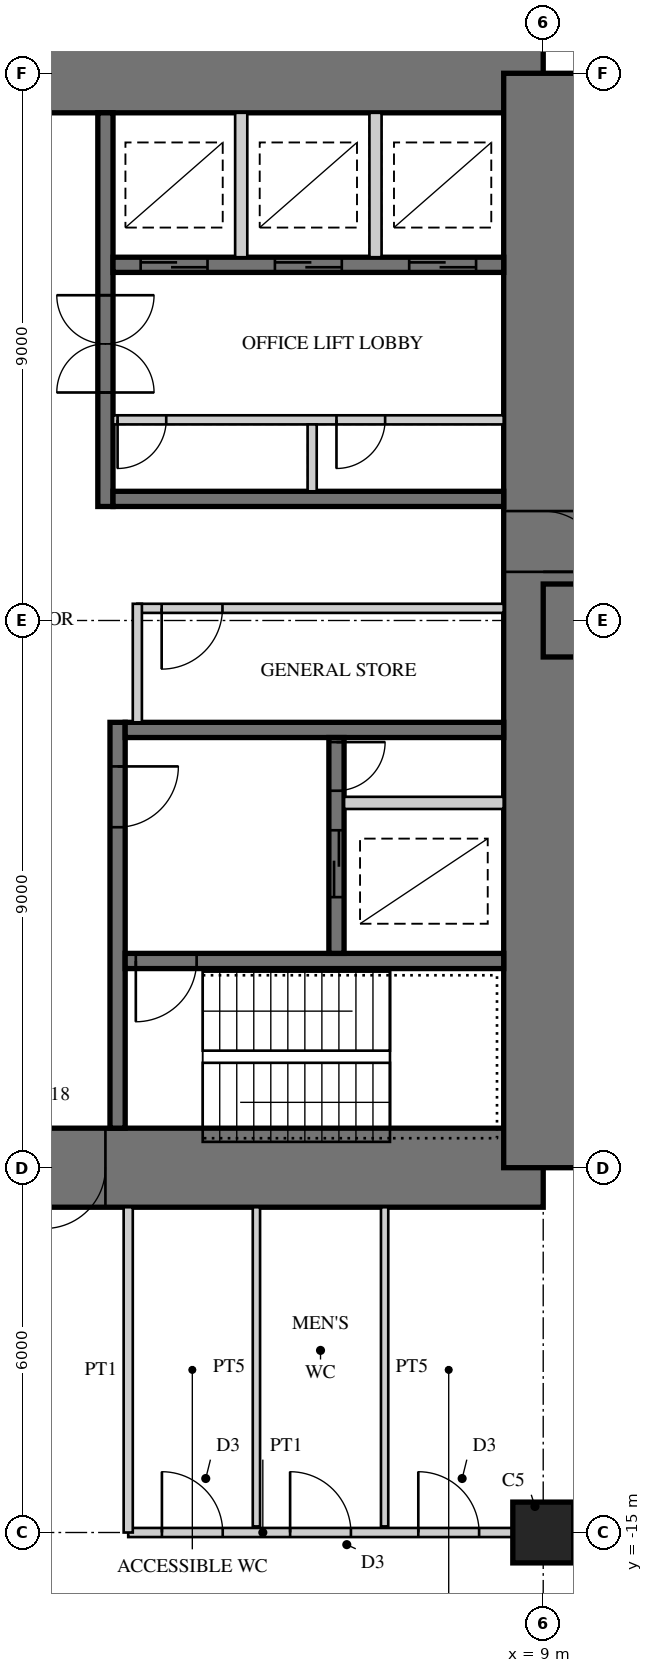
"""IFC4 building model, lengths in metres.
Left out: names, types, materials, properties, quantities, classifications, styles, units other than length and angle.
Written with IfcOpenShell. Run it as: python <this file> out.ifc"""

import sys

from ifc_helpers import new_model, si_unit, direction, frame, frame_2d, origin, origin_2d, place, context, subcontext, project, spatial, rectangle, extrude, element, fill, save


model = new_model("IFC4")
c1 = context("Model", 3, precision=1e-05, world=origin(), true_north=direction((0.0, 1.0)))
c2 = subcontext(c1, "Body", "Model", "MODEL_VIEW")
j1 = project(units=[si_unit("LENGTHUNIT", "METRE"), si_unit("PLANEANGLEUNIT", "RADIAN")], contexts=[c1])
p1 = place(None, origin())
s1 = spatial("IfcSite", under=j1, at=p1, CompositionType="ELEMENT")
p2 = place(p1, origin())
s2 = spatial("IfcBuilding", under=s1, at=p2, CompositionType="ELEMENT")
p3 = place(p2, frame((0.0, 0.0, 100.5)))
s3 = spatial("IfcBuildingStorey", under=s2, at=p3, CompositionType="ELEMENT", Elevation=100.5)
p4 = place(p3, frame((9.0, 9.0, 0.0), z_axis=(0.0, 0.0, 1.0), x_axis=(-1.0, 0.0, 0.0)))
e1 = element("IfcWall", 1, at=p4, inside=s3, PredefinedType="SHEAR", context=c2, shape_type="SweptSolid", body=[
    extrude(rectangle(XDim=18.0, YDim=1.3, at=frame_2d((9.0, 0.0))), origin(), (0.0, 0.0, 1.0), 4.0),
])
p5 = place(p4, frame((9.8, 0.0, 0.0)))
e2 = element("IfcOpeningElement", 2, at=p5, cuts=e1, PredefinedType="OPENING", context=c2, shape_type="SweptSolid", body=[
    extrude(rectangle(XDim=1.0, YDim=2.4, at=frame_2d((0.5, 1.2))), frame((0.0, 0.66, 0.0), z_axis=(0.0, -1.0, 0.0), x_axis=(1.0, 0.0, 0.0)), (0.0, 0.0, 1.0), 1.32),
])
p6 = place(p3, frame((-9.0, -9.0, 0.0), z_axis=(0.0, 0.0, 1.0), x_axis=(1.0, 0.0, 0.0)))
e3 = element("IfcWall", 3, at=p6, inside=s3, PredefinedType="SHEAR", context=c2, shape_type="SweptSolid", body=[
    extrude(rectangle(XDim=18.0, YDim=1.3, at=frame_2d((9.0, 0.0))), origin(), (0.0, 0.0, 1.0), 4.0),
])
p7 = place(p6, frame((9.8, 0.0, 0.0)))
e4 = element("IfcOpeningElement", 4, at=p7, cuts=e3, PredefinedType="OPENING", context=c2, shape_type="SweptSolid", body=[
    extrude(rectangle(XDim=1.0, YDim=2.4, at=frame_2d((0.5, 1.2))), frame((0.0, 0.66, 0.0), z_axis=(0.0, -1.0, 0.0), x_axis=(1.0, 0.0, 0.0)), (0.0, 0.0, 1.0), 1.32),
])
p8 = place(p3, frame((9.0, -9.0, 0.0), z_axis=(0.0, 0.0, 1.0), x_axis=(0.0, 1.0, 0.0)))
e5 = element("IfcWall", 5, at=p8, inside=s3, PredefinedType="SHEAR", context=c2, shape_type="SweptSolid", body=[
    extrude(rectangle(XDim=18.0, YDim=1.3, at=frame_2d((9.0, 0.0))), origin(), (0.0, 0.0, 1.0), 4.0),
])
p9 = place(p8, frame((9.8, 0.0, 0.0)))
e6 = element("IfcOpeningElement", 6, at=p9, cuts=e5, PredefinedType="OPENING", context=c2, shape_type="SweptSolid", body=[
    extrude(rectangle(XDim=1.0, YDim=2.4, at=frame_2d((0.5, 1.2))), frame((0.0, 0.66, 0.0), z_axis=(0.0, -1.0, 0.0), x_axis=(1.0, 0.0, 0.0)), (0.0, 0.0, 1.0), 1.32),
])
p10 = place(p3, frame((1.8, 1.875, 0.0), z_axis=(0.0, 0.0, 1.0), x_axis=(0.0, 1.0, 0.0)))
e7 = element("IfcWall", 7, at=p10, inside=s3, PredefinedType="SHEAR", context=c2, shape_type="SweptSolid", body=[
    extrude(rectangle(XDim=6.475, YDim=0.25, at=frame_2d((3.238, 0.0))), origin(), (0.0, 0.0, 1.0), 4.0),
])
p11 = place(p10, frame((1.875, 0.0, 0.0)))
e8 = element("IfcOpeningElement", 8, at=p11, cuts=e7, PredefinedType="OPENING", context=c2, shape_type="SweptSolid", body=[
    extrude(rectangle(XDim=1.6, YDim=2.4, at=frame_2d((0.8, 1.2))), frame((0.0, 0.135, 0.0), z_axis=(0.0, -1.0, 0.0), x_axis=(1.0, 0.0, 0.0)), (0.0, 0.0, 1.0), 0.27),
])
p12 = place(p3, frame((1.925, 2.0, 0.0), z_axis=(0.0, 0.0, 1.0), x_axis=(1.0, 0.0, 0.0)))
e9 = element("IfcWall", 9, at=p12, inside=s3, PredefinedType="SHEAR", context=c2, shape_type="SweptSolid", body=[
    extrude(rectangle(XDim=6.425, YDim=0.25, at=frame_2d((3.212, 0.0))), origin(), (0.0, 0.0, 1.0), 4.0),
])
p13 = place(p3, frame((1.925, 5.85, 0.0), z_axis=(0.0, 0.0, 1.0), x_axis=(1.0, 0.0, 0.0)))
e10 = element("IfcWall", 10, at=p13, inside=s3, PredefinedType="SHEAR", context=c2, shape_type="SweptSolid", body=[
    extrude(rectangle(XDim=6.425, YDim=0.25, at=frame_2d((3.212, 0.0))), origin(), (0.0, 0.0, 1.0), 4.0),
])
p14 = place(p13, frame((0.454, 0.0, 0.0)))
e11 = element("IfcOpeningElement", 11, at=p14, cuts=e10, PredefinedType="OPENING", context=c2, shape_type="SweptSolid", body=[
    extrude(rectangle(XDim=1.1, YDim=2.2, at=frame_2d((0.55, 1.1))), frame((0.0, 0.135, 0.0), z_axis=(0.0, -1.0, 0.0), x_axis=(1.0, 0.0, 0.0)), (0.0, 0.0, 1.0), 0.27),
])
p15 = place(p13, frame((2.663, 0.0, 0.0)))
e12 = element("IfcOpeningElement", 12, at=p15, cuts=e10, PredefinedType="OPENING", context=c2, shape_type="SweptSolid", body=[
    extrude(rectangle(XDim=1.1, YDim=2.2, at=frame_2d((0.55, 1.1))), frame((0.0, 0.135, 0.0), z_axis=(0.0, -1.0, 0.0), x_axis=(1.0, 0.0, 0.0)), (0.0, 0.0, 1.0), 0.27),
])
p16 = place(p13, frame((4.871, 0.0, 0.0)))
e13 = element("IfcOpeningElement", 13, at=p16, cuts=e10, PredefinedType="OPENING", context=c2, shape_type="SweptSolid", body=[
    extrude(rectangle(XDim=1.1, YDim=2.2, at=frame_2d((0.55, 1.1))), frame((0.0, 0.135, 0.0), z_axis=(0.0, -1.0, 0.0), x_axis=(1.0, 0.0, 0.0)), (0.0, 0.0, 1.0), 0.27),
])
p17 = place(p3, frame((1.925, 3.3, 0.0), z_axis=(0.0, 0.0, 1.0), x_axis=(1.0, 0.0, 0.0)))
e14 = element("IfcWall", 14, at=p17, inside=s3, PredefinedType="PARTITIONING", context=c2, shape_type="SweptSolid", body=[
    extrude(rectangle(XDim=6.425, YDim=0.15, at=frame_2d((3.212, 0.0))), origin(), (0.0, 0.0, 1.0), 4.0),
])
p18 = place(p17, frame((0.075, 0.0, 0.0)))
e15 = element("IfcOpeningElement", 15, at=p18, cuts=e14, PredefinedType="OPENING", context=c2, shape_type="SweptSolid", body=[
    extrude(rectangle(XDim=0.8, YDim=2.1, at=frame_2d((0.4, 1.05))), frame((0.0, 0.085, 0.0), z_axis=(0.0, -1.0, 0.0), x_axis=(1.0, 0.0, 0.0)), (0.0, 0.0, 1.0), 0.17),
])
p19 = place(p17, frame((3.675, 0.0, 0.0)))
e16 = element("IfcOpeningElement", 16, at=p19, cuts=e14, PredefinedType="OPENING", context=c2, shape_type="SweptSolid", body=[
    extrude(rectangle(XDim=0.8, YDim=2.1, at=frame_2d((0.4, 1.05))), frame((0.0, 0.085, 0.0), z_axis=(0.0, -1.0, 0.0), x_axis=(1.0, 0.0, 0.0)), (0.0, 0.0, 1.0), 0.17),
])
p20 = place(p3, frame((5.2, 2.125, 0.0), z_axis=(0.0, 0.0, 1.0), x_axis=(0.0, 1.0, 0.0)))
e17 = element("IfcWall", 17, at=p20, inside=s3, PredefinedType="PARTITIONING", context=c2, shape_type="SweptSolid", body=[
    extrude(rectangle(XDim=1.1, YDim=0.15, at=frame_2d((0.55, 0.0))), origin(), (0.0, 0.0, 1.0), 4.0),
])
for number, where, z_axis, x_axis in (
    (18, (4.033, 5.975, 0.0), (0.0, 0.0, 1.0), (0.0, 1.0, 0.0)),
    (19, (6.242, 5.975, 0.0), (0.0, 0.0, 1.0), (0.0, 1.0, 0.0)),
):
    element("IfcWall", number, at=place(p3, frame(where, z_axis=z_axis, x_axis=x_axis)), inside=s3, PredefinedType="PARTITIONING", context=c2, shape_type="SweptSolid", body=[
        extrude(rectangle(XDim=2.375, YDim=0.2, at=frame_2d((1.188, 0.0))), origin(), (0.0, 0.0, 1.0), 4.0),
    ])
p21 = place(p3, frame((2.0, -1.675, 0.0), z_axis=(0.0, 0.0, 1.0), x_axis=(0.0, -1.0, 0.0)))
e20 = element("IfcWall", 20, at=p21, inside=s3, PredefinedType="SHEAR", context=c2, shape_type="SweptSolid", body=[
    extrude(rectangle(XDim=6.675, YDim=0.25, at=frame_2d((3.337, 0.0))), origin(), (0.0, 0.0, 1.0), 4.0),
])
p22 = place(p21, frame((0.725, 0.0, 0.0)))
e21 = element("IfcOpeningElement", 21, at=p22, cuts=e20, PredefinedType="OPENING", context=c2, shape_type="SweptSolid", body=[
    extrude(rectangle(XDim=1.0, YDim=2.1, at=frame_2d((0.5, 1.05))), frame((0.0, 0.135, 0.0), z_axis=(0.0, -1.0, 0.0), x_axis=(1.0, 0.0, 0.0)), (0.0, 0.0, 1.0), 0.27),
])
p23 = place(p3, frame((2.125, -1.8, 0.0), z_axis=(0.0, 0.0, 1.0), x_axis=(1.0, 0.0, 0.0)))
e22 = element("IfcWall", 22, at=p23, inside=s3, PredefinedType="SHEAR", context=c2, shape_type="SweptSolid", body=[
    extrude(rectangle(XDim=6.225, YDim=0.25, at=frame_2d((3.113, 0.0))), origin(), (0.0, 0.0, 1.0), 4.0),
])
p24 = place(p3, frame((2.125, -5.6, 0.0), z_axis=(0.0, 0.0, 1.0), x_axis=(1.0, 0.0, 0.0)))
e23 = element("IfcWall", 23, at=p24, inside=s3, PredefinedType="SHEAR", context=c2, shape_type="SweptSolid", body=[
    extrude(rectangle(XDim=6.225, YDim=0.25, at=frame_2d((3.113, 0.0))), origin(), (0.0, 0.0, 1.0), 4.0),
])
p25 = place(p24, frame((0.175, 0.0, 0.0)))
e24 = element("IfcOpeningElement", 24, at=p25, cuts=e23, PredefinedType="OPENING", context=c2, shape_type="SweptSolid", body=[
    extrude(rectangle(XDim=1.0, YDim=2.1, at=frame_2d((0.5, 1.05))), frame((0.0, 0.135, 0.0), z_axis=(0.0, -1.0, 0.0), x_axis=(1.0, 0.0, 0.0)), (0.0, 0.0, 1.0), 0.27),
])
p26 = place(p3, frame((5.6, -1.925, 0.0), z_axis=(0.0, 0.0, 1.0), x_axis=(0.0, -1.0, 0.0)))
e25 = element("IfcWall", 25, at=p26, inside=s3, PredefinedType="SHEAR", context=c2, shape_type="SweptSolid", body=[
    extrude(rectangle(XDim=3.55, YDim=0.25, at=frame_2d((1.775, 0.0))), origin(), (0.0, 0.0, 1.0), 4.0),
])
p27 = place(p26, frame((1.525, 0.0, 0.0)))
e26 = element("IfcOpeningElement", 26, at=p27, cuts=e25, PredefinedType="OPENING", context=c2, shape_type="SweptSolid", body=[
    extrude(rectangle(XDim=1.1, YDim=2.2, at=frame_2d((0.55, 1.1))), frame((0.0, 0.135, 0.0), z_axis=(0.0, -1.0, 0.0), x_axis=(1.0, 0.0, 0.0)), (0.0, 0.0, 1.0), 0.27),
])
p28 = place(p26, frame((0.075, 0.0, 0.0)))
e27 = element("IfcOpeningElement", 27, at=p28, cuts=e25, PredefinedType="OPENING", context=c2, shape_type="SweptSolid", body=[
    extrude(rectangle(XDim=0.8, YDim=2.1, at=frame_2d((0.4, 1.05))), frame((0.0, 0.135, 0.0), z_axis=(0.0, -1.0, 0.0), x_axis=(1.0, 0.0, 0.0)), (0.0, 0.0, 1.0), 0.27),
])
p29 = place(p3, frame((5.725, -3.0, 0.0), z_axis=(0.0, 0.0, 1.0), x_axis=(1.0, 0.0, 0.0)))
e28 = element("IfcWall", 28, at=p29, inside=s3, PredefinedType="PARTITIONING", context=c2, shape_type="SweptSolid", body=[
    extrude(rectangle(XDim=2.625, YDim=0.2, at=frame_2d((1.312, 0.0))), origin(), (0.0, 0.0, 1.0), 4.0),
])
p30 = place(p3, frame((9.0, 0.0, 0.0), z_axis=(0.0, 0.0, 1.0), x_axis=(1.0, 0.0, 0.0)))
e29 = element("IfcWall", 29, at=p30, inside=s3, PredefinedType="SHEAR", context=c2, shape_type="SweptSolid", body=[
    extrude(rectangle(XDim=18.0, YDim=1.2, at=frame_2d((9.0, 0.0))), origin(), (0.0, 0.0, 1.0), 4.0),
])
p31 = place(p30, frame((9.8, 0.0, 0.0)))
e30 = element("IfcOpeningElement", 30, at=p31, cuts=e29, PredefinedType="OPENING", context=c2, shape_type="SweptSolid", body=[
    extrude(rectangle(XDim=1.0, YDim=2.2, at=frame_2d((0.5, 1.1))), frame((0.0, 0.61, 0.0), z_axis=(0.0, -1.0, 0.0), x_axis=(1.0, 0.0, 0.0)), (0.0, 0.0, 1.0), 1.22),
])
p32 = place(p3, frame((9.0, -15.0, 0.0), z_axis=(0.0, 0.0, 1.0), x_axis=(1.0, 0.0, 0.0)))
e31 = element("IfcColumn", 31, at=p32, inside=s3, PredefinedType="COLUMN", context=c2, shape_type="SweptSolid", body=[
    extrude(rectangle(XDim=1.0, YDim=1.0, at=origin_2d()), origin(), (0.0, 0.0, 1.0), 4.0),
])
p33 = place(p3, frame((2.325, 0.2, 0.0), z_axis=(0.0, 0.0, 1.0), x_axis=(1.0, 0.0, 0.0)))
e32 = element("IfcWall", 32, at=p33, inside=s3, PredefinedType="PARTITIONING", context=c2, shape_type="SweptSolid", body=[
    extrude(rectangle(XDim=6.025, YDim=0.15, at=frame_2d((3.013, 0.0))), origin(), (0.0, 0.0, 1.0), 3.8),
])
p34 = place(p33, frame((0.4, 0.0, 0.0)))
e33 = element("IfcOpeningElement", 33, at=p34, cuts=e32, PredefinedType="OPENING", context=c2, shape_type="SweptSolid", body=[
    extrude(rectangle(XDim=1.0, YDim=2.1, at=frame_2d((0.5, 1.05))), frame((0.0, 0.085, 0.0), z_axis=(0.0, -1.0, 0.0), x_axis=(1.0, 0.0, 0.0)), (0.0, 0.0, 1.0), 0.17),
])
p35 = place(p3, frame((2.325, -1.675, 0.0), z_axis=(0.0, 0.0, 1.0), x_axis=(0.0, 1.0, 0.0)))
e34 = element("IfcWall", 34, at=p35, inside=s3, PredefinedType="PARTITIONING", context=c2, shape_type="SweptSolid", body=[
    extrude(rectangle(XDim=1.95, YDim=0.15, at=frame_2d((0.975, 0.0))), origin(), (0.0, 0.0, 1.0), 3.8),
])
p36 = place(p3, frame((2.175, -15.0, 0.0), z_axis=(0.0, 0.0, 1.0), x_axis=(1.0, 0.0, 0.0)))
e35 = element("IfcWall", 35, at=p36, inside=s3, PredefinedType="PARTITIONING", context=c2, shape_type="SweptSolid", body=[
    extrude(rectangle(XDim=6.325, YDim=0.15, at=frame_2d((3.163, 0.0))), origin(), (0.0, 0.0, 1.0), 3.0),
])
p37 = place(p36, frame((0.554, 0.0, 0.0)))
e36 = element("IfcOpeningElement", 36, at=p37, cuts=e35, PredefinedType="OPENING", context=c2, shape_type="SweptSolid", body=[
    extrude(rectangle(XDim=1.0, YDim=2.1, at=frame_2d((0.5, 1.05))), frame((0.0, 0.085, 0.0), z_axis=(0.0, -1.0, 0.0), x_axis=(1.0, 0.0, 0.0)), (0.0, 0.0, 1.0), 0.17),
])
p38 = place(p36, frame((2.663, 0.0, 0.0)))
e37 = element("IfcOpeningElement", 37, at=p38, cuts=e35, PredefinedType="OPENING", context=c2, shape_type="SweptSolid", body=[
    extrude(rectangle(XDim=1.0, YDim=2.1, at=frame_2d((0.5, 1.05))), frame((0.0, 0.085, 0.0), z_axis=(0.0, -1.0, 0.0), x_axis=(1.0, 0.0, 0.0)), (0.0, 0.0, 1.0), 0.17),
])
p39 = place(p36, frame((4.771, 0.0, 0.0)))
e38 = element("IfcOpeningElement", 38, at=p39, cuts=e35, PredefinedType="OPENING", context=c2, shape_type="SweptSolid", body=[
    extrude(rectangle(XDim=1.0, YDim=2.1, at=frame_2d((0.5, 1.05))), frame((0.0, 0.085, 0.0), z_axis=(0.0, -1.0, 0.0), x_axis=(1.0, 0.0, 0.0)), (0.0, 0.0, 1.0), 0.17),
])
p40 = place(p3, frame((2.175, -9.65, 0.0), z_axis=(0.0, 0.0, 1.0), x_axis=(0.0, -1.0, 0.0)))
e39 = element("IfcWall", 39, at=p40, inside=s3, PredefinedType="PARTITIONING", context=c2, shape_type="SweptSolid", body=[
    extrude(rectangle(XDim=5.35, YDim=0.15, at=frame_2d((2.675, 0.0))), origin(), (0.0, 0.0, 1.0), 3.8),
])
for number, where, z_axis, x_axis in (
    (40, (4.283, -9.65, 0.0), (0.0, 0.0, 1.0), (0.0, -1.0, 0.0)),
    (41, (6.392, -9.65, 0.0), (0.0, 0.0, 1.0), (0.0, -1.0, 0.0)),
):
    element("IfcWall", number, at=place(p3, frame(where, z_axis=z_axis, x_axis=x_axis)), inside=s3, PredefinedType="PLUMBINGWALL", context=c2, shape_type="SweptSolid", body=[
        extrude(rectangle(XDim=5.25, YDim=0.12, at=frame_2d((2.625, 0.0))), origin(), (0.0, 0.0, 1.0), 3.8),
    ])
p41 = place(p34, frame((1.0, 0.0, 0.0), z_axis=(0.0, 0.0, 1.0), x_axis=(-1.0, 0.0, 0.0)))
e42 = element("IfcDoor", 42, at=p41, inside=s3, OperationType="SINGLE_SWING_RIGHT", PredefinedType="DOOR", context=c2, shape_type="SweptSolid", body=[
    extrude(rectangle(XDim=1.0, YDim=2.1, at=frame_2d((0.5, 1.05))), frame((0.0, 0.025, 0.0), z_axis=(0.0, -1.0, 0.0), x_axis=(1.0, 0.0, 0.0)), (0.0, 0.0, 1.0), 0.05),
])
fill(e33, e42)
p42 = place(p37, origin())
e43 = element("IfcDoor", 43, at=p42, inside=s3, OperationType="SINGLE_SWING_LEFT", PredefinedType="DOOR", context=c2, shape_type="SweptSolid", body=[
    extrude(rectangle(XDim=1.0, YDim=2.1, at=frame_2d((0.5, 1.05))), frame((0.0, 0.025, 0.0), z_axis=(0.0, -1.0, 0.0), x_axis=(1.0, 0.0, 0.0)), (0.0, 0.0, 1.0), 0.05),
])
fill(e36, e43)
p43 = place(p38, origin())
e44 = element("IfcDoor", 44, at=p43, inside=s3, OperationType="SINGLE_SWING_LEFT", PredefinedType="DOOR", context=c2, shape_type="SweptSolid", body=[
    extrude(rectangle(XDim=1.0, YDim=2.1, at=frame_2d((0.5, 1.05))), frame((0.0, 0.025, 0.0), z_axis=(0.0, -1.0, 0.0), x_axis=(1.0, 0.0, 0.0)), (0.0, 0.0, 1.0), 0.05),
])
fill(e37, e44)
p44 = place(p39, origin())
e45 = element("IfcDoor", 45, at=p44, inside=s3, OperationType="SINGLE_SWING_LEFT", PredefinedType="DOOR", context=c2, shape_type="SweptSolid", body=[
    extrude(rectangle(XDim=1.0, YDim=2.1, at=frame_2d((0.5, 1.05))), frame((0.0, 0.025, 0.0), z_axis=(0.0, -1.0, 0.0), x_axis=(1.0, 0.0, 0.0)), (0.0, 0.0, 1.0), 0.05),
])
fill(e38, e45)
p45 = place(p7, frame((1.0, 0.0, 0.0), z_axis=(0.0, 0.0, 1.0), x_axis=(-1.0, 0.0, 0.0)))
e46 = element("IfcDoor", 46, at=p45, inside=s3, OperationType="SINGLE_SWING_RIGHT", PredefinedType="DOOR", context=c2, shape_type="SweptSolid", body=[
    extrude(rectangle(XDim=1.0, YDim=2.4, at=frame_2d((0.5, 1.2))), frame((0.0, -0.005, 0.0), z_axis=(0.0, -1.0, 0.0), x_axis=(1.0, 0.0, 0.0)), (0.0, 0.0, 1.0), 0.05),
])
fill(e4, e46)
p46 = place(p9, frame((1.0, 0.0, 0.0), z_axis=(0.0, 0.0, 1.0), x_axis=(-1.0, 0.0, 0.0)))
e47 = element("IfcDoor", 47, at=p46, inside=s3, OperationType="SINGLE_SWING_RIGHT", PredefinedType="DOOR", context=c2, shape_type="SweptSolid", body=[
    extrude(rectangle(XDim=1.0, YDim=2.4, at=frame_2d((0.5, 1.2))), frame((0.0, -0.005, 0.0), z_axis=(0.0, -1.0, 0.0), x_axis=(1.0, 0.0, 0.0)), (0.0, 0.0, 1.0), 0.05),
])
fill(e6, e47)
p47 = place(p14, origin())
e48 = element("IfcDoor", 48, at=p47, inside=s3, OperationType="DOUBLE_DOOR_SLIDING", PredefinedType="DOOR", context=c2, shape_type="SweptSolid", body=[
    extrude(rectangle(XDim=1.1, YDim=2.2, at=frame_2d((0.55, 1.1))), frame((0.0, 0.025, 0.0), z_axis=(0.0, -1.0, 0.0), x_axis=(1.0, 0.0, 0.0)), (0.0, 0.0, 1.0), 0.05),
])
fill(e11, e48)
p48 = place(p15, origin())
e49 = element("IfcDoor", 49, at=p48, inside=s3, OperationType="DOUBLE_DOOR_SLIDING", PredefinedType="DOOR", context=c2, shape_type="SweptSolid", body=[
    extrude(rectangle(XDim=1.1, YDim=2.2, at=frame_2d((0.55, 1.1))), frame((0.0, 0.025, 0.0), z_axis=(0.0, -1.0, 0.0), x_axis=(1.0, 0.0, 0.0)), (0.0, 0.0, 1.0), 0.05),
])
fill(e12, e49)
p49 = place(p16, origin())
e50 = element("IfcDoor", 50, at=p49, inside=s3, OperationType="DOUBLE_DOOR_SLIDING", PredefinedType="DOOR", context=c2, shape_type="SweptSolid", body=[
    extrude(rectangle(XDim=1.1, YDim=2.2, at=frame_2d((0.55, 1.1))), frame((0.0, 0.025, 0.0), z_axis=(0.0, -1.0, 0.0), x_axis=(1.0, 0.0, 0.0)), (0.0, 0.0, 1.0), 0.05),
])
fill(e13, e50)
p50 = place(p11, origin())
e51 = element("IfcDoor", 51, at=p50, inside=s3, OperationType="DOUBLE_DOOR_DOUBLE_SWING", PredefinedType="DOOR", context=c2, shape_type="SweptSolid", body=[
    extrude(rectangle(XDim=1.6, YDim=2.4, at=frame_2d((0.8, 1.2))), frame((0.0, 0.025, 0.0), z_axis=(0.0, -1.0, 0.0), x_axis=(1.0, 0.0, 0.0)), (0.0, 0.0, 1.0), 0.05),
])
fill(e8, e51)
p51 = place(p18, frame((0.8, 0.0, 0.0), z_axis=(0.0, 0.0, 1.0), x_axis=(-1.0, 0.0, 0.0)))
e52 = element("IfcDoor", 52, at=p51, inside=s3, OperationType="SINGLE_SWING_RIGHT", PredefinedType="DOOR", context=c2, shape_type="SweptSolid", body=[
    extrude(rectangle(XDim=0.8, YDim=2.1, at=frame_2d((0.4, 1.05))), frame((0.0, 0.025, 0.0), z_axis=(0.0, -1.0, 0.0), x_axis=(1.0, 0.0, 0.0)), (0.0, 0.0, 1.0), 0.05),
])
fill(e15, e52)
p52 = place(p19, frame((0.8, 0.0, 0.0), z_axis=(0.0, 0.0, 1.0), x_axis=(-1.0, 0.0, 0.0)))
e53 = element("IfcDoor", 53, at=p52, inside=s3, OperationType="SINGLE_SWING_RIGHT", PredefinedType="DOOR", context=c2, shape_type="SweptSolid", body=[
    extrude(rectangle(XDim=0.8, YDim=2.1, at=frame_2d((0.4, 1.05))), frame((0.0, 0.025, 0.0), z_axis=(0.0, -1.0, 0.0), x_axis=(1.0, 0.0, 0.0)), (0.0, 0.0, 1.0), 0.05),
])
fill(e16, e53)
p53 = place(p22, origin())
e54 = element("IfcDoor", 54, at=p53, inside=s3, OperationType="SINGLE_SWING_LEFT", PredefinedType="DOOR", context=c2, shape_type="SweptSolid", body=[
    extrude(rectangle(XDim=1.0, YDim=2.1, at=frame_2d((0.5, 1.05))), frame((0.0, 0.025, 0.0), z_axis=(0.0, -1.0, 0.0), x_axis=(1.0, 0.0, 0.0)), (0.0, 0.0, 1.0), 0.05),
])
fill(e21, e54)
p54 = place(p25, frame((1.0, 0.0, 0.0), z_axis=(0.0, 0.0, 1.0), x_axis=(-1.0, 0.0, 0.0)))
e55 = element("IfcDoor", 55, at=p54, inside=s3, OperationType="SINGLE_SWING_RIGHT", PredefinedType="DOOR", context=c2, shape_type="SweptSolid", body=[
    extrude(rectangle(XDim=1.0, YDim=2.1, at=frame_2d((0.5, 1.05))), frame((0.0, 0.025, 0.0), z_axis=(0.0, -1.0, 0.0), x_axis=(1.0, 0.0, 0.0)), (0.0, 0.0, 1.0), 0.05),
])
fill(e24, e55)
p55 = place(p27, origin())
e56 = element("IfcDoor", 56, at=p55, inside=s3, OperationType="DOUBLE_DOOR_SLIDING", PredefinedType="DOOR", context=c2, shape_type="SweptSolid", body=[
    extrude(rectangle(XDim=1.1, YDim=2.2, at=frame_2d((0.55, 1.1))), frame((0.0, 0.025, 0.0), z_axis=(0.0, -1.0, 0.0), x_axis=(1.0, 0.0, 0.0)), (0.0, 0.0, 1.0), 0.05),
])
fill(e26, e56)
p56 = place(p28, origin())
e57 = element("IfcDoor", 57, at=p56, inside=s3, OperationType="SINGLE_SWING_LEFT", PredefinedType="DOOR", context=c2, shape_type="SweptSolid", body=[
    extrude(rectangle(XDim=0.8, YDim=2.1, at=frame_2d((0.4, 1.05))), frame((0.0, 0.025, 0.0), z_axis=(0.0, -1.0, 0.0), x_axis=(1.0, 0.0, 0.0)), (0.0, 0.0, 1.0), 0.05),
])
fill(e27, e57)
save(model, sys.argv[1])
